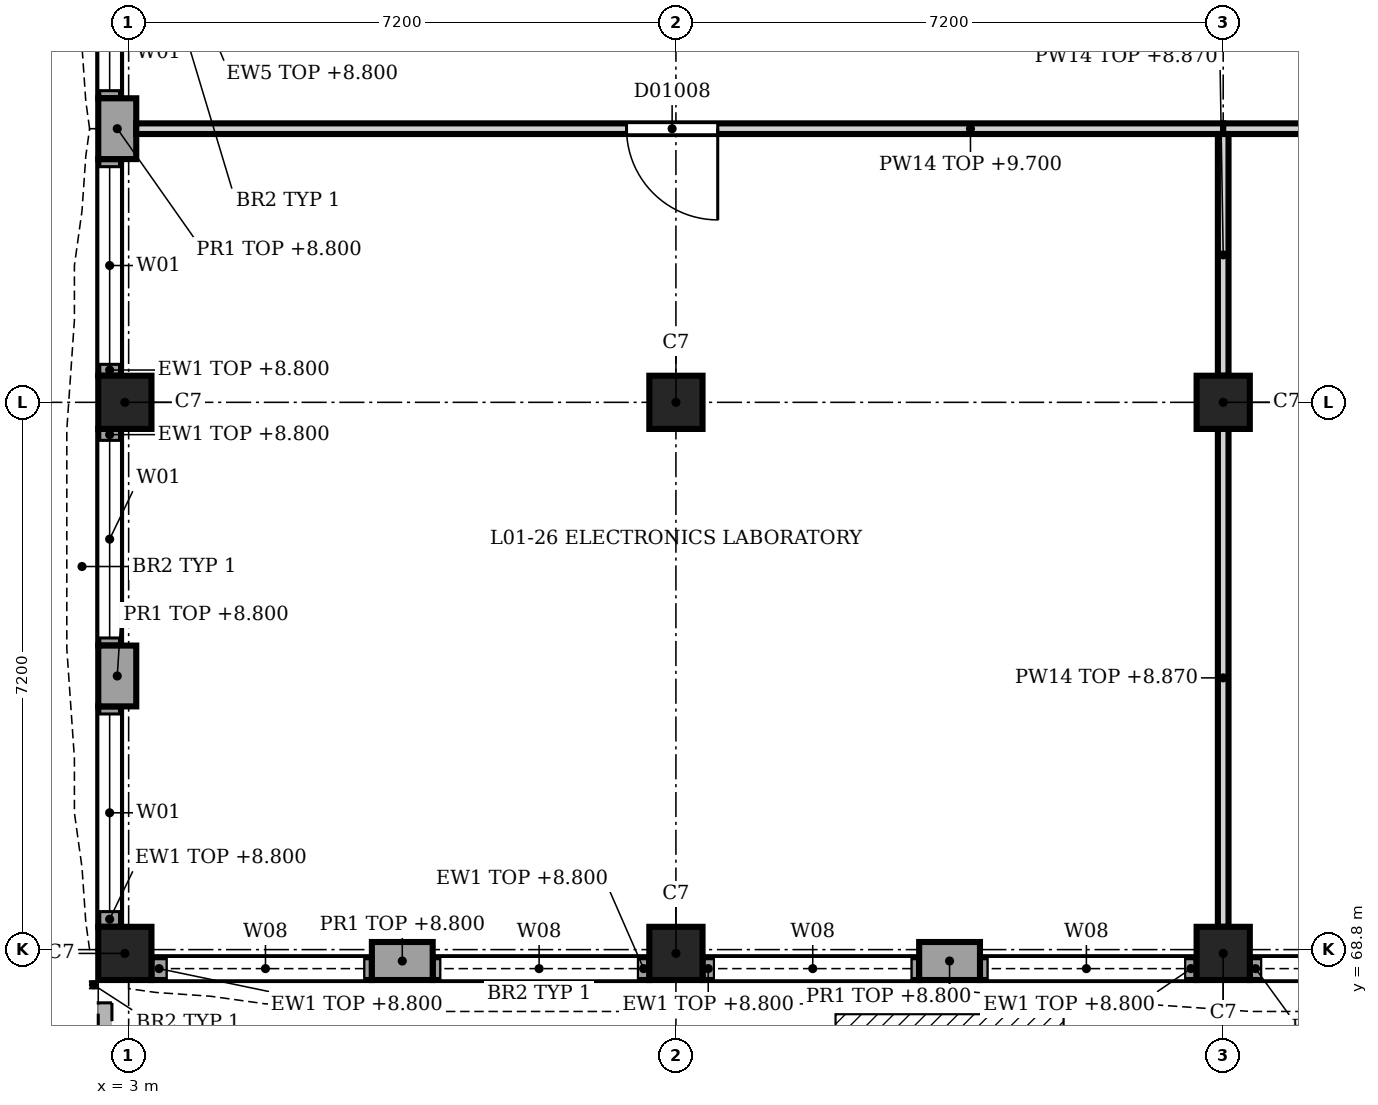
"""IFC4 building model, lengths in metres.
Left out: names, types, materials, properties, quantities, classifications, styles, units other than length and angle.
Written with IfcOpenShell. Run it as: python <this file> out.ifc"""

import sys

from ifc_helpers import new_model, si_unit, direction, frame, frame_2d, origin, origin_2d, place, context, subcontext, project, spatial, rectangle, extrude, element, fill, save


model = new_model("IFC4")
c1 = context("Model", 3, precision=1e-05, world=origin(), true_north=direction((0.0, 1.0)))
c2 = subcontext(c1, "Body", "Model", "MODEL_VIEW")
j1 = project(units=[si_unit("LENGTHUNIT", "METRE"), si_unit("PLANEANGLEUNIT", "RADIAN")], contexts=[c1])
p1 = place(None, origin())
s1 = spatial("IfcSite", under=j1, at=p1, CompositionType="ELEMENT")
p2 = place(p1, origin())
s2 = spatial("IfcBuilding", under=s1, at=p2, CompositionType="ELEMENT")
p3 = place(p2, frame((0.0, 0.0, 5.4)))
s3 = spatial("IfcBuildingStorey", under=s2, at=p3, CompositionType="ELEMENT", Elevation=5.4)
for number, where, z_axis, x_axis in (
    (1, (2.95, 68.75, 0.0), (0.0, 0.0, 1.0), (1.0, 0.0, 0.0)),
    (2, (2.95, 76.0, 0.0), (0.0, 0.0, 1.0), (1.0, 0.0, 0.0)),
    (3, (10.2, 68.75, 0.0), (0.0, 0.0, 1.0), (1.0, 0.0, 0.0)),
    (4, (10.2, 76.0, 0.0), (0.0, 0.0, 1.0), (1.0, 0.0, 0.0)),
    (5, (17.4, 68.75, 0.0), (0.0, 0.0, 1.0), (1.0, 0.0, 0.0)),
    (6, (17.4, 76.0, 0.0), (0.0, 0.0, 1.0), (1.0, 0.0, 0.0)),
):
    element("IfcColumn", number, at=place(p3, frame(where, z_axis=z_axis, x_axis=x_axis)), inside=s3, PredefinedType="COLUMN", context=c2, shape_type="SweptSolid", body=[
        extrude(rectangle(XDim=0.7, YDim=0.7, at=origin_2d()), origin(), (0.0, 0.0, 1.0), 4.5),
    ])
for number, where, z_axis, x_axis in (
    (7, (14.2, 68.65, 0.0), (0.0, 0.0, 1.0), (-1.0, 0.0, 0.0)),
    (8, (7.0, 68.65, 0.0), (0.0, 0.0, 1.0), (-1.0, 0.0, 0.0)),
):
    element("IfcWall", number, at=place(p3, frame(where, z_axis=z_axis, x_axis=x_axis)), inside=s3, PredefinedType="SOLIDWALL", context=c2, shape_type="SweptSolid", body=[
        extrude(rectangle(XDim=0.8, YDim=0.5, at=frame_2d((0.4, 0.0))), origin(), (0.0, 0.0, 1.0), 3.4),
    ])
p4 = place(p3, frame((20.6, 68.55, 0.0), z_axis=(0.0, 0.0, 1.0), x_axis=(-1.0, 0.0, 0.0)))
e9 = element("IfcWall", 9, at=p4, inside=s3, PredefinedType="SOLIDWALL", context=c2, shape_type="SweptSolid", body=[
    extrude(rectangle(XDim=2.85, YDim=0.3, at=frame_2d((1.425, 0.0))), origin(), (0.0, 0.0, 1.0), 3.4),
])
p5 = place(p4, frame((0.1, 0.0, 1.2)))
e10 = element("IfcOpeningElement", 10, at=p5, cuts=e9, PredefinedType="OPENING", context=c2, shape_type="SweptSolid", body=[
    extrude(rectangle(XDim=2.6, YDim=2.1, at=frame_2d((1.3, 1.05))), frame((0.0, 0.16, 0.0), z_axis=(0.0, -1.0, 0.0), x_axis=(1.0, 0.0, 0.0)), (0.0, 0.0, 1.0), 0.32),
])
p6 = place(p3, frame((17.05, 68.55, 0.0), z_axis=(0.0, 0.0, 1.0), x_axis=(-1.0, 0.0, 0.0)))
e11 = element("IfcWall", 11, at=p6, inside=s3, PredefinedType="SOLIDWALL", context=c2, shape_type="SweptSolid", body=[
    extrude(rectangle(XDim=2.85, YDim=0.3, at=frame_2d((1.425, 0.0))), origin(), (0.0, 0.0, 1.0), 3.4),
])
p7 = place(p6, frame((0.15, 0.0, 1.2)))
e12 = element("IfcOpeningElement", 12, at=p7, cuts=e11, PredefinedType="OPENING", context=c2, shape_type="SweptSolid", body=[
    extrude(rectangle(XDim=2.6, YDim=2.1, at=frame_2d((1.3, 1.05))), frame((0.0, 0.16, 0.0), z_axis=(0.0, -1.0, 0.0), x_axis=(1.0, 0.0, 0.0)), (0.0, 0.0, 1.0), 0.32),
])
p8 = place(p3, frame((13.4, 68.55, 0.0), z_axis=(0.0, 0.0, 1.0), x_axis=(-1.0, 0.0, 0.0)))
e13 = element("IfcWall", 13, at=p8, inside=s3, PredefinedType="SOLIDWALL", context=c2, shape_type="SweptSolid", body=[
    extrude(rectangle(XDim=2.85, YDim=0.3, at=frame_2d((1.425, 0.0))), origin(), (0.0, 0.0, 1.0), 3.4),
])
p9 = place(p8, frame((0.1, 0.0, 1.2)))
e14 = element("IfcOpeningElement", 14, at=p9, cuts=e13, PredefinedType="OPENING", context=c2, shape_type="SweptSolid", body=[
    extrude(rectangle(XDim=2.6, YDim=2.1, at=frame_2d((1.3, 1.05))), frame((0.0, 0.16, 0.0), z_axis=(0.0, -1.0, 0.0), x_axis=(1.0, 0.0, 0.0)), (0.0, 0.0, 1.0), 0.32),
])
p10 = place(p3, frame((9.85, 68.55, 0.0), z_axis=(0.0, 0.0, 1.0), x_axis=(-1.0, 0.0, 0.0)))
e15 = element("IfcWall", 15, at=p10, inside=s3, PredefinedType="SOLIDWALL", context=c2, shape_type="SweptSolid", body=[
    extrude(rectangle(XDim=2.85, YDim=0.3, at=frame_2d((1.425, 0.0))), origin(), (0.0, 0.0, 1.0), 3.4),
])
p11 = place(p10, frame((0.15, 0.0, 1.2)))
e16 = element("IfcOpeningElement", 16, at=p11, cuts=e15, PredefinedType="OPENING", context=c2, shape_type="SweptSolid", body=[
    extrude(rectangle(XDim=2.6, YDim=2.1, at=frame_2d((1.3, 1.05))), frame((0.0, 0.16, 0.0), z_axis=(0.0, -1.0, 0.0), x_axis=(1.0, 0.0, 0.0)), (0.0, 0.0, 1.0), 0.32),
])
p12 = place(p3, frame((6.2, 68.55, 0.0), z_axis=(0.0, 0.0, 1.0), x_axis=(-1.0, 0.0, 0.0)))
e17 = element("IfcWall", 17, at=p12, inside=s3, PredefinedType="SOLIDWALL", context=c2, shape_type="SweptSolid", body=[
    extrude(rectangle(XDim=2.9, YDim=0.3, at=frame_2d((1.45, 0.0))), origin(), (0.0, 0.0, 1.0), 3.4),
])
p13 = place(p12, frame((0.1, 0.0, 1.2)))
e18 = element("IfcOpeningElement", 18, at=p13, cuts=e17, PredefinedType="OPENING", context=c2, shape_type="SweptSolid", body=[
    extrude(rectangle(XDim=2.6, YDim=2.1, at=frame_2d((1.3, 1.05))), frame((0.0, 0.16, 0.0), z_axis=(0.0, -1.0, 0.0), x_axis=(1.0, 0.0, 0.0)), (0.0, 0.0, 1.0), 0.32),
])
for number, where, z_axis, x_axis in (
    (19, (2.85, 72.0, 0.0), (0.0, 0.0, 1.0), (0.0, 1.0, 0.0)),
    (20, (2.85, 79.2, 0.0), (0.0, 0.0, 1.0), (0.0, 1.0, 0.0)),
):
    element("IfcWall", number, at=place(p3, frame(where, z_axis=z_axis, x_axis=x_axis)), inside=s3, PredefinedType="SOLIDWALL", context=c2, shape_type="SweptSolid", body=[
        extrude(rectangle(XDim=0.8, YDim=0.5, at=frame_2d((0.4, 0.0))), origin(), (0.0, 0.0, 1.0), 3.4),
    ])
p14 = place(p3, frame((2.75, 69.1, 0.0), z_axis=(0.0, 0.0, 1.0), x_axis=(0.0, 1.0, 0.0)))
e21 = element("IfcWall", 21, at=p14, inside=s3, PredefinedType="SOLIDWALL", context=c2, shape_type="SweptSolid", body=[
    extrude(rectangle(XDim=2.9, YDim=0.3, at=frame_2d((1.45, 0.0))), origin(), (0.0, 0.0, 1.0), 3.4),
])
p15 = place(p14, frame((0.2, 0.0, 0.9)))
e22 = element("IfcOpeningElement", 22, at=p15, cuts=e21, PredefinedType="OPENING", context=c2, shape_type="SweptSolid", body=[
    extrude(rectangle(XDim=2.6, YDim=2.4, at=frame_2d((1.3, 1.2))), frame((0.0, 0.16, 0.0), z_axis=(0.0, -1.0, 0.0), x_axis=(1.0, 0.0, 0.0)), (0.0, 0.0, 1.0), 0.32),
])
p16 = place(p3, frame((2.75, 72.8, 0.0), z_axis=(0.0, 0.0, 1.0), x_axis=(0.0, 1.0, 0.0)))
e23 = element("IfcWall", 23, at=p16, inside=s3, PredefinedType="SOLIDWALL", context=c2, shape_type="SweptSolid", body=[
    extrude(rectangle(XDim=2.85, YDim=0.3, at=frame_2d((1.425, 0.0))), origin(), (0.0, 0.0, 1.0), 3.4),
])
p17 = place(p16, frame((0.1, 0.0, 0.9)))
e24 = element("IfcOpeningElement", 24, at=p17, cuts=e23, PredefinedType="OPENING", context=c2, shape_type="SweptSolid", body=[
    extrude(rectangle(XDim=2.6, YDim=2.4, at=frame_2d((1.3, 1.2))), frame((0.0, 0.16, 0.0), z_axis=(0.0, -1.0, 0.0), x_axis=(1.0, 0.0, 0.0)), (0.0, 0.0, 1.0), 0.32),
])
p18 = place(p3, frame((2.75, 76.35, 0.0), z_axis=(0.0, 0.0, 1.0), x_axis=(0.0, 1.0, 0.0)))
e25 = element("IfcWall", 25, at=p18, inside=s3, PredefinedType="SOLIDWALL", context=c2, shape_type="SweptSolid", body=[
    extrude(rectangle(XDim=2.85, YDim=0.3, at=frame_2d((1.425, 0.0))), origin(), (0.0, 0.0, 1.0), 3.4),
])
p19 = place(p18, frame((0.15, 0.0, 0.9)))
e26 = element("IfcOpeningElement", 26, at=p19, cuts=e25, PredefinedType="OPENING", context=c2, shape_type="SweptSolid", body=[
    extrude(rectangle(XDim=2.6, YDim=2.4, at=frame_2d((1.3, 1.2))), frame((0.0, 0.16, 0.0), z_axis=(0.0, -1.0, 0.0), x_axis=(1.0, 0.0, 0.0)), (0.0, 0.0, 1.0), 0.32),
])
p20 = place(p3, frame((2.75, 80.0, 0.0), z_axis=(0.0, 0.0, 1.0), x_axis=(0.0, 1.0, 0.0)))
e27 = element("IfcWall", 27, at=p20, inside=s3, PredefinedType="SOLIDWALL", context=c2, shape_type="SweptSolid", body=[
    extrude(rectangle(XDim=2.85, YDim=0.3, at=frame_2d((1.425, 0.0))), origin(), (0.0, 0.0, 1.0), 3.4),
])
p21 = place(p20, frame((0.1, 0.0, 0.9)))
e28 = element("IfcOpeningElement", 28, at=p21, cuts=e27, PredefinedType="OPENING", context=c2, shape_type="SweptSolid", body=[
    extrude(rectangle(XDim=2.6, YDim=2.4, at=frame_2d((1.3, 1.2))), frame((0.0, 0.16, 0.0), z_axis=(0.0, -1.0, 0.0), x_axis=(1.0, 0.0, 0.0)), (0.0, 0.0, 1.0), 0.32),
])
p22 = place(p3, frame((2.69, 68.1, 0.0), z_axis=(0.0, 0.0, 1.0), x_axis=(0.0, -1.0, 0.0)))
e29 = element("IfcWall", 29, at=p22, inside=s3, PredefinedType="PARAPET", context=c2, shape_type="SweptSolid", body=[
    extrude(rectangle(XDim=3.0, YDim=0.18, at=frame_2d((1.5, 0.0))), origin(), (0.0, 0.0, 1.0), 0.9),
])
p23 = place(p3, frame((17.4, 79.6, 0.0), z_axis=(0.0, 0.0, 1.0), x_axis=(-1.0, 0.0, 0.0)))
e30 = element("IfcWall", 30, at=p23, inside=s3, PredefinedType="PARTITIONING", context=c2, shape_type="SweptSolid", body=[
    extrude(rectangle(XDim=14.3, YDim=0.14, at=frame_2d((7.15, 0.0))), origin(), (0.0, 0.0, 1.0), 4.3),
])
p24 = place(p23, frame((6.65, 0.0, 0.0)))
e31 = element("IfcOpeningElement", 31, at=p24, cuts=e30, PredefinedType="OPENING", context=c2, shape_type="SweptSolid", body=[
    extrude(rectangle(XDim=1.2, YDim=2.1, at=frame_2d((0.6, 1.05))), frame((0.0, 0.08, 0.0), z_axis=(0.0, -1.0, 0.0), x_axis=(1.0, 0.0, 0.0)), (0.0, 0.0, 1.0), 0.16),
])
p25 = place(p3, frame((31.8, 79.6, 0.0), z_axis=(0.0, 0.0, 1.0), x_axis=(-1.0, 0.0, 0.0)))
e32 = element("IfcWall", 32, at=p25, inside=s3, PredefinedType="PARTITIONING", context=c2, shape_type="SweptSolid", body=[
    extrude(rectangle(XDim=14.4, YDim=0.14, at=frame_2d((7.2, 0.0))), origin(), (0.0, 0.0, 1.0), 4.3),
])
p26 = place(p25, frame((6.65, 0.0, 0.0)))
e33 = element("IfcOpeningElement", 33, at=p26, cuts=e32, PredefinedType="OPENING", context=c2, shape_type="SweptSolid", body=[
    extrude(rectangle(XDim=1.2, YDim=2.1, at=frame_2d((0.6, 1.05))), frame((0.0, 0.08, 0.0), z_axis=(0.0, -1.0, 0.0), x_axis=(1.0, 0.0, 0.0)), (0.0, 0.0, 1.0), 0.16),
])
p27 = place(p3, frame((17.4, 69.1, 0.0), z_axis=(0.0, 0.0, 1.0), x_axis=(0.0, 1.0, 0.0)))
e34 = element("IfcWall", 34, at=p27, inside=s3, PredefinedType="PARTITIONING", context=c2, shape_type="SweptSolid", body=[
    extrude(rectangle(XDim=6.55, YDim=0.14, at=frame_2d((3.275, 0.0))), origin(), (0.0, 0.0, 1.0), 3.47),
])
p28 = place(p3, frame((17.4, 76.35, 0.0), z_axis=(0.0, 0.0, 1.0), x_axis=(0.0, 1.0, 0.0)))
e35 = element("IfcWall", 35, at=p28, inside=s3, PredefinedType="PARTITIONING", context=c2, shape_type="SweptSolid", body=[
    extrude(rectangle(XDim=3.18, YDim=0.14, at=frame_2d((1.59, 0.0))), origin(), (0.0, 0.0, 1.0), 3.47),
])
p29 = place(p5, origin())
e36 = element("IfcWindow", 36, at=p29, inside=s3, PartitioningType="SINGLE_PANEL", PredefinedType="WINDOW", context=c2, shape_type="SweptSolid", body=[
    extrude(rectangle(XDim=2.6, YDim=2.1, at=frame_2d((1.3, 1.05))), frame((0.0, 0.03, 0.0), z_axis=(0.0, -1.0, 0.0), x_axis=(1.0, 0.0, 0.0)), (0.0, 0.0, 1.0), 0.06),
])
fill(e10, e36)
p30 = place(p7, origin())
e37 = element("IfcWindow", 37, at=p30, inside=s3, PartitioningType="SINGLE_PANEL", PredefinedType="WINDOW", context=c2, shape_type="SweptSolid", body=[
    extrude(rectangle(XDim=2.6, YDim=2.1, at=frame_2d((1.3, 1.05))), frame((0.0, 0.03, 0.0), z_axis=(0.0, -1.0, 0.0), x_axis=(1.0, 0.0, 0.0)), (0.0, 0.0, 1.0), 0.06),
])
fill(e12, e37)
p31 = place(p9, origin())
e38 = element("IfcWindow", 38, at=p31, inside=s3, PartitioningType="SINGLE_PANEL", PredefinedType="WINDOW", context=c2, shape_type="SweptSolid", body=[
    extrude(rectangle(XDim=2.6, YDim=2.1, at=frame_2d((1.3, 1.05))), frame((0.0, 0.03, 0.0), z_axis=(0.0, -1.0, 0.0), x_axis=(1.0, 0.0, 0.0)), (0.0, 0.0, 1.0), 0.06),
])
fill(e14, e38)
p32 = place(p11, origin())
e39 = element("IfcWindow", 39, at=p32, inside=s3, PartitioningType="SINGLE_PANEL", PredefinedType="WINDOW", context=c2, shape_type="SweptSolid", body=[
    extrude(rectangle(XDim=2.6, YDim=2.1, at=frame_2d((1.3, 1.05))), frame((0.0, 0.03, 0.0), z_axis=(0.0, -1.0, 0.0), x_axis=(1.0, 0.0, 0.0)), (0.0, 0.0, 1.0), 0.06),
])
fill(e16, e39)
p33 = place(p13, origin())
e40 = element("IfcWindow", 40, at=p33, inside=s3, PartitioningType="SINGLE_PANEL", PredefinedType="WINDOW", context=c2, shape_type="SweptSolid", body=[
    extrude(rectangle(XDim=2.6, YDim=2.1, at=frame_2d((1.3, 1.05))), frame((0.0, 0.03, 0.0), z_axis=(0.0, -1.0, 0.0), x_axis=(1.0, 0.0, 0.0)), (0.0, 0.0, 1.0), 0.06),
])
fill(e18, e40)
p34 = place(p15, origin())
e41 = element("IfcWindow", 41, at=p34, inside=s3, PartitioningType="SINGLE_PANEL", PredefinedType="WINDOW", context=c2, shape_type="SweptSolid", body=[
    extrude(rectangle(XDim=2.6, YDim=2.4, at=frame_2d((1.3, 1.2))), frame((0.0, 0.03, 0.0), z_axis=(0.0, -1.0, 0.0), x_axis=(1.0, 0.0, 0.0)), (0.0, 0.0, 1.0), 0.06),
])
fill(e22, e41)
p35 = place(p17, origin())
e42 = element("IfcWindow", 42, at=p35, inside=s3, PartitioningType="SINGLE_PANEL", PredefinedType="WINDOW", context=c2, shape_type="SweptSolid", body=[
    extrude(rectangle(XDim=2.6, YDim=2.4, at=frame_2d((1.3, 1.2))), frame((0.0, 0.03, 0.0), z_axis=(0.0, -1.0, 0.0), x_axis=(1.0, 0.0, 0.0)), (0.0, 0.0, 1.0), 0.06),
])
fill(e24, e42)
p36 = place(p19, origin())
e43 = element("IfcWindow", 43, at=p36, inside=s3, PartitioningType="SINGLE_PANEL", PredefinedType="WINDOW", context=c2, shape_type="SweptSolid", body=[
    extrude(rectangle(XDim=2.6, YDim=2.4, at=frame_2d((1.3, 1.2))), frame((0.0, 0.03, 0.0), z_axis=(0.0, -1.0, 0.0), x_axis=(1.0, 0.0, 0.0)), (0.0, 0.0, 1.0), 0.06),
])
fill(e26, e43)
p37 = place(p21, origin())
e44 = element("IfcWindow", 44, at=p37, inside=s3, PartitioningType="SINGLE_PANEL", PredefinedType="WINDOW", context=c2, shape_type="SweptSolid", body=[
    extrude(rectangle(XDim=2.6, YDim=2.4, at=frame_2d((1.3, 1.2))), frame((0.0, 0.03, 0.0), z_axis=(0.0, -1.0, 0.0), x_axis=(1.0, 0.0, 0.0)), (0.0, 0.0, 1.0), 0.06),
])
fill(e28, e44)
p38 = place(p24, origin())
e45 = element("IfcDoor", 45, at=p38, inside=s3, OperationType="SINGLE_SWING_RIGHT", PredefinedType="DOOR", context=c2, shape_type="SweptSolid", body=[
    extrude(rectangle(XDim=1.2, YDim=2.1, at=frame_2d((0.6, 1.05))), frame((0.0, 0.025, 0.0), z_axis=(0.0, -1.0, 0.0), x_axis=(1.0, 0.0, 0.0)), (0.0, 0.0, 1.0), 0.05),
])
fill(e31, e45)
save(model, sys.argv[1])
